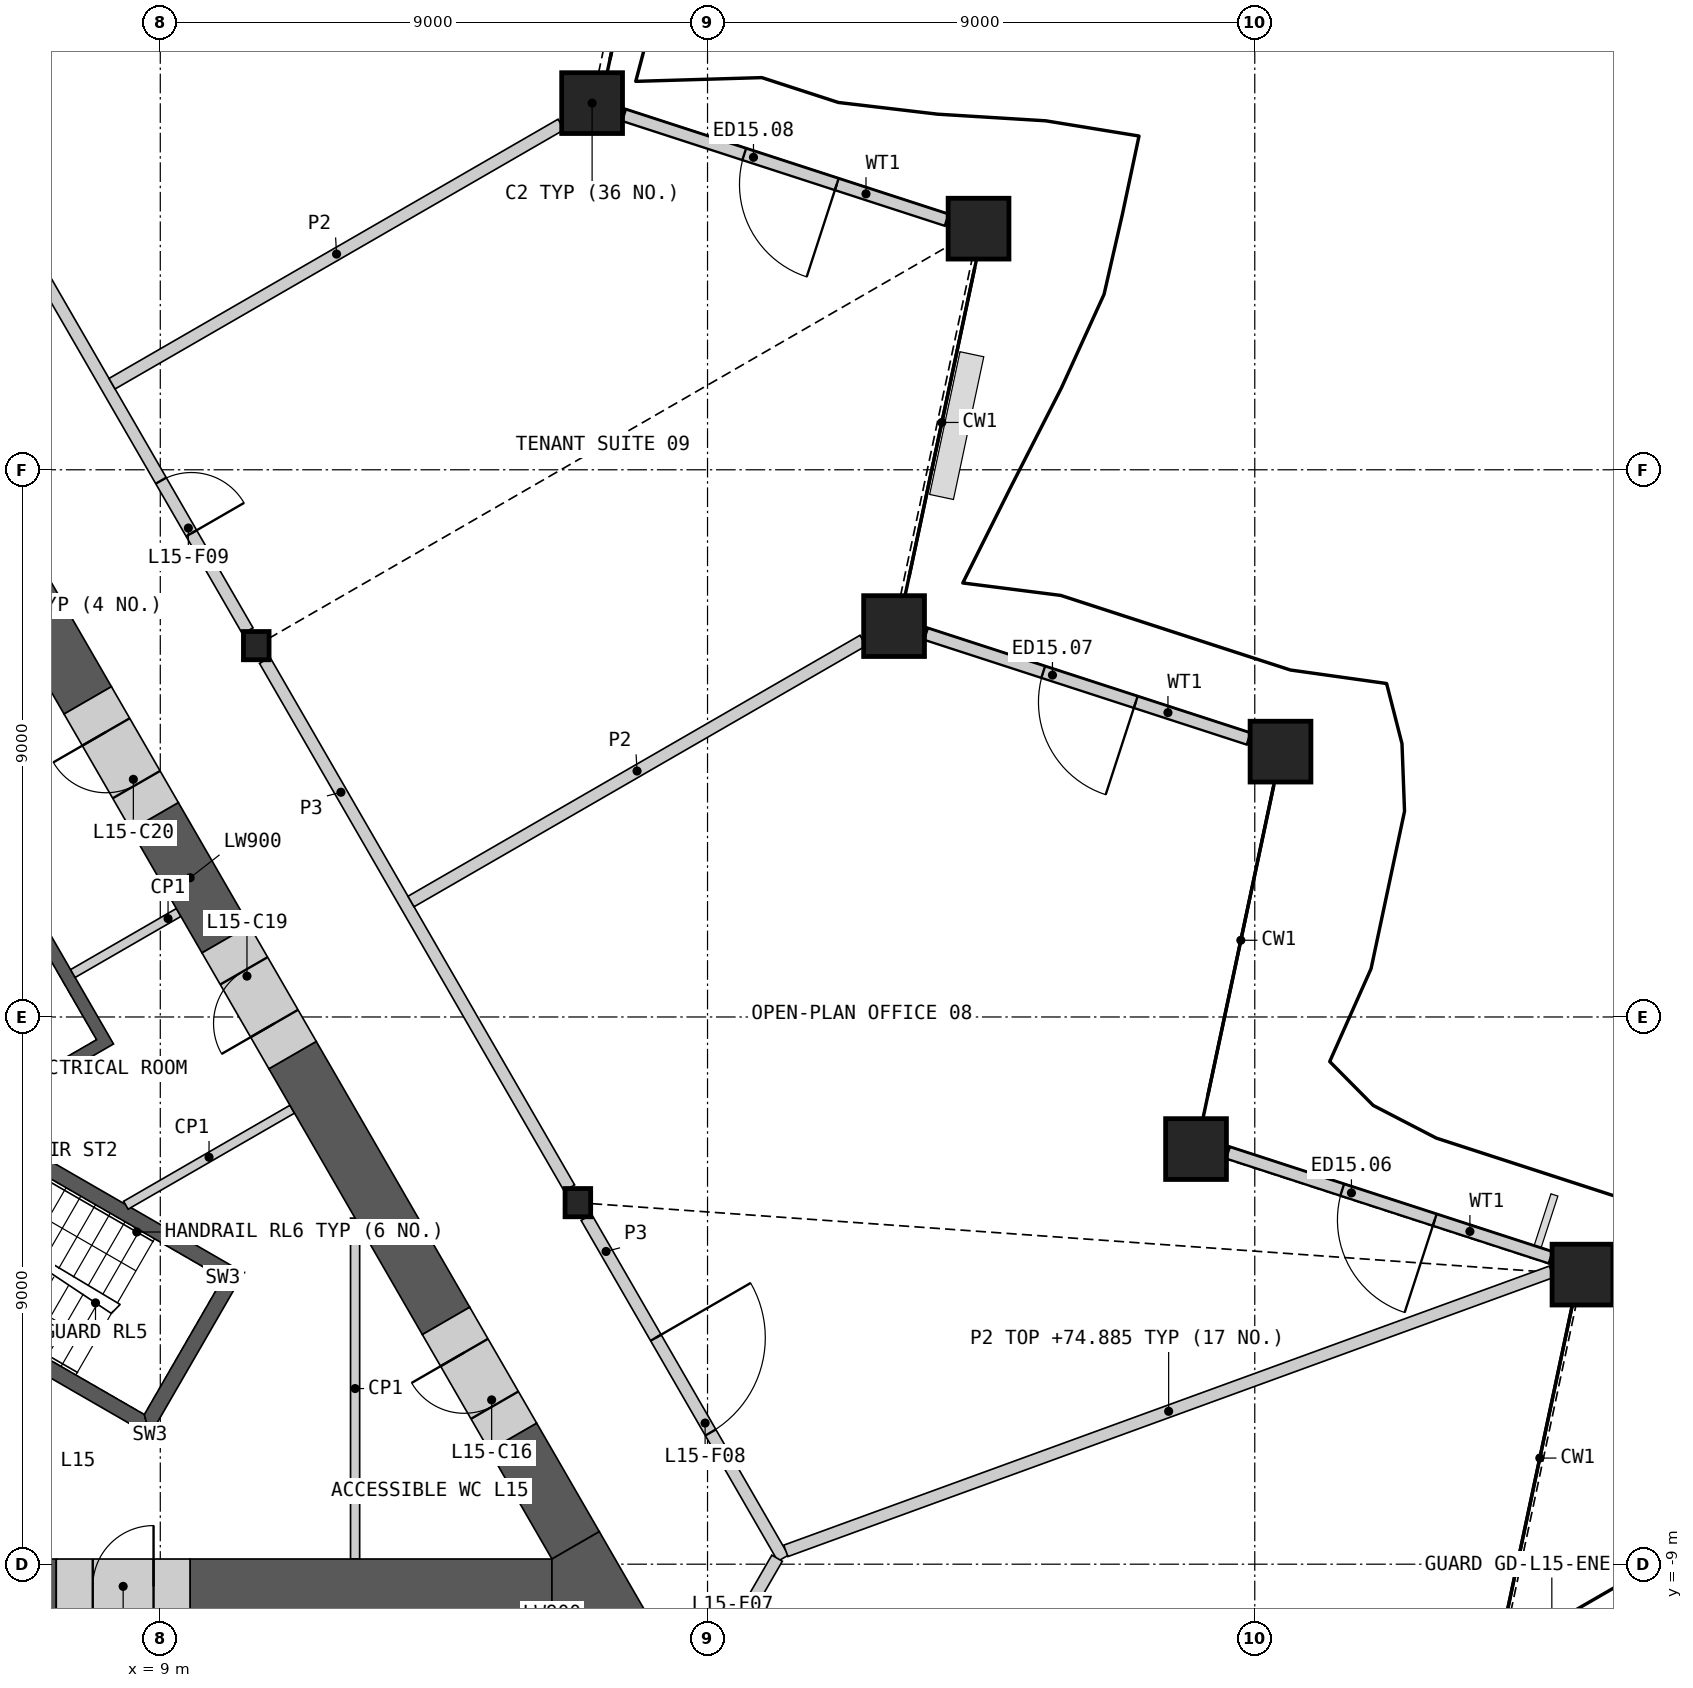
"""IFC4 building model, lengths in metres.
Left out: names, types, materials, properties, quantities, classifications, styles, units other than length and angle.
Written with IfcOpenShell. Run it as: python <this file> out.ifc"""

import sys

from ifc_helpers import new_model, si_unit, direction, frame, frame_2d, origin, origin_2d, place, context, subcontext, project, spatial, polyline, rectangle, hollow_rectangle, i_section, outline, extrude, element, fill, save


model = new_model("IFC4")
c1 = context("Model", 3, precision=1e-05, world=origin(), true_north=direction((0.0, 1.0)))
c2 = subcontext(c1, "Body", "Model", "MODEL_VIEW")
j1 = project(units=[si_unit("LENGTHUNIT", "METRE"), si_unit("PLANEANGLEUNIT", "RADIAN")], contexts=[c1])
p1 = place(None, origin())
s1 = spatial("IfcSite", under=j1, at=p1, CompositionType="ELEMENT")
p2 = place(p1, origin())
s2 = spatial("IfcBuilding", under=s1, at=p2, CompositionType="ELEMENT")
p3 = place(p2, frame((0.0, 0.0, 72.0)))
s3 = spatial("IfcBuildingStorey", under=s2, at=p3, CompositionType="ELEMENT", Elevation=72.0)
for number, where, z_axis, x_axis in (
    (1, (32.389, -4.237, 0.0), (0.0, 0.0, 1.0), (1.0, 0.0, 0.0)),
    (2, (26.034, -2.172, 0.0), (0.0, 0.0, 1.0), (1.0, 0.0, 0.0)),
    (3, (27.423, 4.364, 0.0), (0.0, 0.0, 1.0), (1.0, 0.0, 0.0)),
    (4, (21.068, 6.429, 0.0), (0.0, 0.0, 1.0), (1.0, 0.0, 0.0)),
    (5, (22.457, 12.966, 0.0), (0.0, 0.0, 1.0), (1.0, 0.0, 0.0)),
    (6, (16.102, 15.031, 0.0), (0.0, 0.0, 1.0), (1.0, 0.0, 0.0)),
):
    element("IfcColumn", number, at=place(p3, frame(where, z_axis=z_axis, x_axis=x_axis)), inside=s3, PredefinedType="COLUMN", context=c2, shape_type="SweptSolid", body=[
        extrude(hollow_rectangle(XDim=1.0, YDim=1.0, WallThickness=0.07, at=origin_2d()), origin(), (0.0, 0.0, 1.0), 4.2),
    ])
for number, where, z_axis, x_axis in (
    (7, (15.868, -3.054, 0.0), (0.0, 0.0, 1.0), (1.0, 0.0, 0.0)),
    (8, (10.578, 6.107, 0.0), (0.0, 0.0, 1.0), (1.0, 0.0, 0.0)),
):
    element("IfcColumn", number, at=place(p3, frame(where, z_axis=z_axis, x_axis=x_axis)), inside=s3, PredefinedType="COLUMN", context=c2, shape_type="SweptSolid", body=[
        extrude(i_section(OverallWidth=0.421, OverallDepth=0.465, WebThickness=0.045, FlangeThickness=0.072, at=origin_2d()), origin(), (0.0, 0.0, 1.0), 4.2),
    ])
p4 = place(p3, frame((31.865, -3.958, 0.0), z_axis=(0.0, 0.0, 1.0), x_axis=(-0.951066864375, 0.308985144444, 0.0)))
e9 = element("IfcWall", 9, at=p4, inside=s3, PredefinedType="SOLIDWALL", context=c2, shape_type="SweptSolid", body=[
    extrude(rectangle(XDim=5.579, YDim=0.2, at=frame_2d((2.79, 0.0))), origin(), (0.0, 0.0, 1.0), 3.189),
])
p5 = place(p4, frame((2.003, 0.0, 0.0)))
e10 = element("IfcOpeningElement", 10, at=p5, cuts=e9, PredefinedType="OPENING", context=c2, shape_type="SweptSolid", body=[
    extrude(rectangle(XDim=1.6, YDim=2.4, at=frame_2d((0.8, 1.2))), frame((0.0, 0.11, 0.0), z_axis=(0.0, -1.0, 0.0), x_axis=(1.0, 0.0, 0.0)), (0.0, 0.0, 1.0), 0.22),
])
p6 = place(p3, frame((26.899, 4.575, 0.0), z_axis=(0.0, 0.0, 1.0), x_axis=(-0.951066864375, 0.308985144444, 0.0)))
e11 = element("IfcWall", 11, at=p6, inside=s3, PredefinedType="SOLIDWALL", context=c2, shape_type="SweptSolid", body=[
    extrude(rectangle(XDim=5.579, YDim=0.2, at=frame_2d((2.79, 0.0))), origin(), (0.0, 0.0, 1.0), 3.189),
])
p7 = place(p6, frame((1.952, 0.0, 0.0)))
e12 = element("IfcOpeningElement", 12, at=p7, cuts=e11, PredefinedType="OPENING", context=c2, shape_type="SweptSolid", body=[
    extrude(rectangle(XDim=1.6, YDim=2.4, at=frame_2d((0.8, 1.2))), frame((0.0, 0.11, 0.0), z_axis=(0.0, -1.0, 0.0), x_axis=(1.0, 0.0, 0.0)), (0.0, 0.0, 1.0), 0.22),
])
p8 = place(p3, frame((21.933, 13.107, 0.0), z_axis=(0.0, 0.0, 1.0), x_axis=(-0.951066864375, 0.308985144444, 0.0)))
e13 = element("IfcWall", 13, at=p8, inside=s3, PredefinedType="SOLIDWALL", context=c2, shape_type="SweptSolid", body=[
    extrude(rectangle(XDim=5.579, YDim=0.2, at=frame_2d((2.79, 0.0))), origin(), (0.0, 0.0, 1.0), 3.189),
])
p9 = place(p8, frame((1.9, 0.0, 0.0)))
e14 = element("IfcOpeningElement", 14, at=p9, cuts=e13, PredefinedType="OPENING", context=c2, shape_type="SweptSolid", body=[
    extrude(rectangle(XDim=1.6, YDim=2.4, at=frame_2d((0.8, 1.2))), frame((0.0, 0.11, 0.0), z_axis=(0.0, -1.0, 0.0), x_axis=(1.0, 0.0, 0.0)), (0.0, 0.0, 1.0), 0.22),
])
p10 = place(p3, origin())
e15 = element("IfcWall", 15, at=p10, inside=s3, PredefinedType="SHEAR", context=c2, shape_type="SweptSolid", body=[
    extrude(outline(polyline([(2.66, 4.192), (4.831, 5.445), (8.231, -0.444), (6.061, -1.697), (5.96, -1.524), (7.952, -0.374), (6.952, 1.358), (4.96, 0.208), (4.861, 0.381), (6.852, 1.531), (5.852, 3.263), (3.861, 2.113), (3.76, 2.287), (5.752, 3.437), (4.752, 5.169), (2.76, 4.019), (2.66, 4.192)])), origin(), (0.0, 0.0, 1.0), 3.8),
])
p11 = place(p3, origin())
e16 = element("IfcWall", 16, at=p11, inside=s3, PredefinedType="SHEAR", context=c2, shape_type="SweptSolid", body=[
    extrude(outline(polyline([(3.763, -3.956), (8.83, -6.881), (8.738, -6.539), (3.888, -3.739), (3.763, -3.956)])), origin(), (0.0, 0.0, 1.0), 3.8),
])
p12 = place(p3, origin())
e17 = element("IfcWall", 17, at=p12, inside=s3, PredefinedType="SHEAR", context=c2, shape_type="SweptSolid", body=[
    extrude(outline(polyline([(8.83, -6.881), (10.374, -4.206), (10.032, -4.298), (8.738, -6.539), (8.83, -6.881)])), origin(), (0.0, 0.0, 1.0), 3.8),
])
p13 = place(p3, origin())
e18 = element("IfcWall", 18, at=p13, inside=s3, PredefinedType="SHEAR", context=c2, shape_type="SweptSolid", body=[
    extrude(outline(polyline([(10.032, -4.298), (10.374, -4.206), (5.307, -1.281), (5.182, -1.498), (10.032, -4.298)])), origin(), (0.0, 0.0, 1.0), 3.8),
])
p14 = place(p3, frame((9.302, 1.719, 0.0), z_axis=(0.0, 0.0, 1.0), x_axis=(-0.866035824272, -0.499981950752, 0.0)))
e19 = element("IfcWall", 19, at=p14, inside=s3, PredefinedType="PARTITIONING", context=c2, shape_type="SweptSolid", body=[
    extrude(rectangle(XDim=2.009, YDim=0.15, at=frame_2d((1.004, 0.0))), origin(), (0.0, 0.0, 1.0), 3.8),
])
p15 = place(p3, frame((11.17, -1.517, 0.0), z_axis=(0.0, 0.0, 1.0), x_axis=(-0.866037599206, -0.499978876315, 0.0)))
e20 = element("IfcWall", 20, at=p15, inside=s3, PredefinedType="PARTITIONING", context=c2, shape_type="SweptSolid", body=[
    extrude(rectangle(XDim=3.159, YDim=0.15, at=frame_2d((1.58, 0.0))), origin(), (0.0, 0.0, 1.0), 3.8),
])
p16 = place(p3, frame((12.204, -8.915, 0.0), z_axis=(0.0, 0.0, 1.0), x_axis=(0.0, 1.0, 0.0)))
e21 = element("IfcWall", 21, at=p16, inside=s3, PredefinedType="PARTITIONING", context=c2, shape_type="SweptSolid", body=[
    extrude(rectangle(XDim=5.607, YDim=0.15, at=frame_2d((2.804, 0.0))), origin(), (0.0, 0.0, 1.0), 3.8),
])
p17 = place(p3, frame((1.1, -9.365, 0.0), z_axis=(0.0, 0.0, 1.0), x_axis=(1.0, 0.0, 0.0)))
e22 = element("IfcWall", 22, at=p17, inside=s3, PredefinedType="SHEAR", context=c2, shape_type="SweptSolid", body=[
    extrude(rectangle(XDim=6.189, YDim=0.9, at=frame_2d((3.095, 0.0))), origin(), (0.0, 0.0, 1.0), 3.8),
])
p18 = place(p3, frame((9.49, -9.365, 0.0), z_axis=(0.0, 0.0, 1.0), x_axis=(1.0, 0.0, 0.0)))
e23 = element("IfcWall", 23, at=p18, inside=s3, PredefinedType="SHEAR", context=c2, shape_type="SweptSolid", body=[
    extrude(rectangle(XDim=5.952, YDim=0.9, at=frame_2d((2.976, 0.0))), origin(), (0.0, 0.0, 1.0), 3.8),
])
p19 = place(p3, frame((7.807, 5.208, 0.0), z_axis=(0.0, 0.0, 1.0), x_axis=(-0.499986664161, 0.866033103098, 0.0)))
e24 = element("IfcWall", 24, at=p19, inside=s3, PredefinedType="SHEAR", context=c2, shape_type="SweptSolid", body=[
    extrude(rectangle(XDim=6.586, YDim=0.9, at=frame_2d((3.293, 0.0))), origin(), (0.0, 0.0, 1.0), 3.8),
])
p20 = place(p3, frame((13.7, -4.999, 0.0), z_axis=(0.0, 0.0, 1.0), x_axis=(-0.499993158726, 0.86602935356, 0.0)))
e25 = element("IfcWall", 25, at=p20, inside=s3, PredefinedType="SHEAR", context=c2, shape_type="SweptSolid", body=[
    extrude(rectangle(XDim=5.048, YDim=0.9, at=frame_2d((2.524, 0.0))), origin(), (0.0, 0.0, 1.0), 3.8),
])
p21 = place(p3, frame((10.075, 1.279, 0.0), z_axis=(0.0, 0.0, 1.0), x_axis=(-0.500026924946, 0.866009858102, 0.0)))
e26 = element("IfcWall", 26, at=p21, inside=s3, PredefinedType="SHEAR", context=c2, shape_type="SweptSolid", body=[
    extrude(rectangle(XDim=2.337, YDim=0.9, at=frame_2d((1.168, 0.0))), origin(), (0.0, 0.0, 1.0), 3.8),
])
p22 = place(p3, frame((15.831, -8.69, 0.0), z_axis=(0.0, 0.0, 1.0), x_axis=(-0.499971832445, 0.866041665719, 0.0)))
e27 = element("IfcWall", 27, at=p22, inside=s3, PredefinedType="SHEAR", context=c2, shape_type="SweptSolid", body=[
    extrude(rectangle(XDim=2.062, YDim=0.9, at=frame_2d((1.031, 0.0))), origin(), (0.0, 0.0, 1.0), 3.8),
])
p23 = place(p3, origin())
e28 = element("IfcWall", 28, at=p23, inside=s3, PredefinedType="SHEAR", context=c2, shape_type="SweptSolid", body=[
    extrude(outline(polyline([(15.441, -9.815), (15.441, -8.915), (16.221, -8.465), (17.0, -9.815), (15.441, -9.815)])), origin(), (0.0, 0.0, 1.0), 3.8),
])
p24 = place(p3, frame((14.8, -6.904, 0.0), z_axis=(0.0, 0.0, 1.0), x_axis=(-0.50002983664, 0.866008176907, 0.0)))
e29 = element("IfcWall", 29, at=p24, inside=s3, PredefinedType="SHEAR", context=c2, shape_type="SweptSolid", body=[
    extrude(rectangle(XDim=2.2, YDim=0.9, at=frame_2d((1.1, 0.0))), origin(), (0.0, 0.0, 1.0), 3.8),
])
p25 = place(p24, frame((0.6, 0.0, 0.0)))
e30 = element("IfcOpeningElement", 30, at=p25, cuts=e29, PredefinedType="OPENING", context=c2, shape_type="SweptSolid", body=[
    extrude(rectangle(XDim=1.0, YDim=2.1, at=frame_2d((0.5, 1.05))), frame((0.0, 0.46, 0.0), z_axis=(0.0, -1.0, 0.0), x_axis=(1.0, 0.0, 0.0)), (0.0, 0.0, 1.0), 0.92),
])
p26 = place(p3, frame((7.289, -9.365, 0.0), z_axis=(0.0, 0.0, 1.0), x_axis=(1.0, 0.0, 0.0)))
e31 = element("IfcWall", 31, at=p26, inside=s3, PredefinedType="SHEAR", context=c2, shape_type="SweptSolid", body=[
    extrude(rectangle(XDim=2.2, YDim=0.9, at=frame_2d((1.1, 0.0))), origin(), (0.0, 0.0, 1.0), 3.8),
])
p27 = place(p26, frame((0.6, 0.0, 0.0)))
e32 = element("IfcOpeningElement", 32, at=p27, cuts=e31, PredefinedType="OPENING", context=c2, shape_type="SweptSolid", body=[
    extrude(rectangle(XDim=1.0, YDim=2.1, at=frame_2d((0.5, 1.05))), frame((0.0, 0.46, 0.0), z_axis=(0.0, -1.0, 0.0), x_axis=(1.0, 0.0, 0.0)), (0.0, 0.0, 1.0), 0.92),
])
p28 = place(p3, frame((11.176, -0.627, 0.0), z_axis=(0.0, 0.0, 1.0), x_axis=(-0.499946605688, 0.86605622881, 0.0)))
e33 = element("IfcWall", 33, at=p28, inside=s3, PredefinedType="SHEAR", context=c2, shape_type="SweptSolid", body=[
    extrude(rectangle(XDim=2.2, YDim=0.9, at=frame_2d((1.1, 0.0))), origin(), (0.0, 0.0, 1.0), 3.8),
])
p29 = place(p28, frame((0.6, 0.0, 0.0)))
e34 = element("IfcOpeningElement", 34, at=p29, cuts=e33, PredefinedType="OPENING", context=c2, shape_type="SweptSolid", body=[
    extrude(rectangle(XDim=1.0, YDim=2.1, at=frame_2d((0.5, 1.05))), frame((0.0, 0.46, 0.0), z_axis=(0.0, -1.0, 0.0), x_axis=(1.0, 0.0, 0.0)), (0.0, 0.0, 1.0), 0.92),
])
p30 = place(p3, frame((8.907, 3.302, 0.0), z_axis=(0.0, 0.0, 1.0), x_axis=(-0.50002983664, 0.866008176907, 0.0)))
e35 = element("IfcWall", 35, at=p30, inside=s3, PredefinedType="SHEAR", context=c2, shape_type="SweptSolid", body=[
    extrude(rectangle(XDim=2.2, YDim=0.9, at=frame_2d((1.1, 0.0))), origin(), (0.0, 0.0, 1.0), 3.8),
])
p31 = place(p30, frame((0.6, 0.0, 0.0)))
e36 = element("IfcOpeningElement", 36, at=p31, cuts=e35, PredefinedType="OPENING", context=c2, shape_type="SweptSolid", body=[
    extrude(rectangle(XDim=1.0, YDim=2.1, at=frame_2d((0.5, 1.05))), frame((0.0, 0.46, 0.0), z_axis=(0.0, -1.0, 0.0), x_axis=(1.0, 0.0, 0.0)), (0.0, 0.0, 1.0), 0.92),
])
p32 = place(p3, frame((10.719, 5.865, 0.0), z_axis=(0.0, 0.0, 1.0), x_axis=(0.49999175339, -0.866030164915, 0.0)))
e37 = element("IfcWall", 37, at=p32, inside=s3, PredefinedType="PARTITIONING", context=c2, shape_type="SweptSolid", body=[
    extrude(rectangle(XDim=10.019, YDim=0.2, at=frame_2d((5.009, 0.0))), origin(), (0.0, 0.0, 1.0), 3.8),
])
p33 = place(p3, frame((5.429, 15.026, 0.0), z_axis=(0.0, 0.0, 1.0), x_axis=(0.50001002959, -0.86601961312, 0.0)))
e38 = element("IfcWall", 38, at=p33, inside=s3, PredefinedType="PARTITIONING", context=c2, shape_type="SweptSolid", body=[
    extrude(rectangle(XDim=10.019, YDim=0.2, at=frame_2d((5.009, 0.0))), origin(), (0.0, 0.0, 1.0), 3.8),
])
p34 = place(p33, frame((7.165, 0.0, 0.0)))
e39 = element("IfcOpeningElement", 39, at=p34, cuts=e38, PredefinedType="OPENING", context=c2, shape_type="SweptSolid", body=[
    extrude(rectangle(XDim=1.0, YDim=2.1, at=frame_2d((0.5, 1.05))), frame((0.0, 0.11, 0.0), z_axis=(0.0, -1.0, 0.0), x_axis=(1.0, 0.0, 0.0)), (0.0, 0.0, 1.0), 0.22),
])
p35 = place(p3, frame((16.008, -3.296, 0.0), z_axis=(0.0, 0.0, 1.0), x_axis=(0.499984737558, -0.86603421538, 0.0)))
e40 = element("IfcWall", 40, at=p35, inside=s3, PredefinedType="PARTITIONING", context=c2, shape_type="SweptSolid", body=[
    extrude(rectangle(XDim=6.473, YDim=0.2, at=frame_2d((3.236, 0.0))), origin(), (0.0, 0.0, 1.0), 3.8),
])
p36 = place(p35, frame((2.285, 0.0, 0.0)))
e41 = element("IfcOpeningElement", 41, at=p36, cuts=e40, PredefinedType="OPENING", context=c2, shape_type="SweptSolid", body=[
    extrude(rectangle(XDim=1.8, YDim=2.1, at=frame_2d((0.9, 1.05))), frame((0.0, 0.11, 0.0), z_axis=(0.0, -1.0, 0.0), x_axis=(1.0, 0.0, 0.0)), (0.0, 0.0, 1.0), 0.22),
])
p37 = place(p3, frame((17.281, -12.128, 0.0), z_axis=(0.0, 0.0, 1.0), x_axis=(0.499958791762, 0.866049194065, 0.0)))
e42 = element("IfcWall", 42, at=p37, inside=s3, PredefinedType="PARTITIONING", context=c2, shape_type="SweptSolid", body=[
    extrude(rectangle(XDim=3.726, YDim=0.2, at=frame_2d((1.863, 0.0))), origin(), (0.0, 0.0, 1.0), 3.8),
])
p38 = place(p37, frame((1.363, 0.0, 0.0)))
e43 = element("IfcOpeningElement", 43, at=p38, cuts=e42, PredefinedType="OPENING", context=c2, shape_type="SweptSolid", body=[
    extrude(rectangle(XDim=1.0, YDim=2.1, at=frame_2d((0.5, 1.05))), frame((0.0, 0.11, 0.0), z_axis=(0.0, -1.0, 0.0), x_axis=(1.0, 0.0, 0.0)), (0.0, 0.0, 1.0), 0.22),
])
p39 = place(p3, frame((19.288, -8.781, 0.0), z_axis=(0.0, 0.0, 1.0), x_axis=(0.939515478087, 0.34250644729, 0.0)))
e44 = element("IfcWall", 44, at=p39, inside=s3, PredefinedType="PARTITIONING", context=c2, shape_type="SweptSolid", body=[
    extrude(rectangle(XDim=13.402, YDim=0.2, at=frame_2d((6.701, 0.0))), origin(), (0.0, 0.0, 1.0), 2.885),
])
p40 = place(p3, frame((13.124, 1.899, 0.0), z_axis=(0.0, 0.0, 1.0), x_axis=(0.866024086673, 0.500002281298, 0.0)))
e45 = element("IfcWall", 45, at=p40, inside=s3, PredefinedType="PARTITIONING", context=c2, shape_type="SweptSolid", body=[
    extrude(rectangle(XDim=8.584, YDim=0.2, at=frame_2d((4.292, 0.0))), origin(), (0.0, 0.0, 1.0), 2.885),
])
p41 = place(p3, frame((8.207, 10.416, 0.0), z_axis=(0.0, 0.0, 1.0), x_axis=(0.866023490266, 0.500003314297, 0.0)))
e46 = element("IfcWall", 46, at=p41, inside=s3, PredefinedType="PARTITIONING", context=c2, shape_type="SweptSolid", body=[
    extrude(rectangle(XDim=8.528, YDim=0.2, at=frame_2d((4.264, 0.0))), origin(), (0.0, 0.0, 1.0), 2.885),
])
p42 = place(p5, origin())
e47 = element("IfcDoor", 47, at=p42, inside=s3, OperationType="DOUBLE_DOOR_SINGLE_SWING", PredefinedType="DOOR", context=c2, shape_type="SweptSolid", body=[
    extrude(rectangle(XDim=1.6, YDim=2.4, at=frame_2d((0.8, 1.2))), frame((0.0, 0.025, 0.0), z_axis=(0.0, -1.0, 0.0), x_axis=(1.0, 0.0, 0.0)), (0.0, 0.0, 1.0), 0.05),
])
fill(e10, e47)
p43 = place(p7, origin())
e48 = element("IfcDoor", 48, at=p43, inside=s3, OperationType="DOUBLE_DOOR_SINGLE_SWING", PredefinedType="DOOR", context=c2, shape_type="SweptSolid", body=[
    extrude(rectangle(XDim=1.6, YDim=2.4, at=frame_2d((0.8, 1.2))), frame((0.0, 0.025, 0.0), z_axis=(0.0, -1.0, 0.0), x_axis=(1.0, 0.0, 0.0)), (0.0, 0.0, 1.0), 0.05),
])
fill(e12, e48)
p44 = place(p9, origin())
e49 = element("IfcDoor", 49, at=p44, inside=s3, OperationType="DOUBLE_DOOR_SINGLE_SWING", PredefinedType="DOOR", context=c2, shape_type="SweptSolid", body=[
    extrude(rectangle(XDim=1.6, YDim=2.4, at=frame_2d((0.8, 1.2))), frame((0.0, 0.025, 0.0), z_axis=(0.0, -1.0, 0.0), x_axis=(1.0, 0.0, 0.0)), (0.0, 0.0, 1.0), 0.05),
])
fill(e14, e49)
p45 = place(p25, origin())
e50 = element("IfcDoor", 50, at=p45, inside=s3, OperationType="SINGLE_SWING_RIGHT", PredefinedType="DOOR", context=c2, shape_type="SweptSolid", body=[
    extrude(rectangle(XDim=1.0, YDim=2.1, at=frame_2d((0.5, 1.05))), frame((0.0, 0.205, 0.0), z_axis=(0.0, -1.0, 0.0), x_axis=(1.0, 0.0, 0.0)), (0.0, 0.0, 1.0), 0.05),
])
fill(e30, e50)
p46 = place(p27, origin())
e51 = element("IfcDoor", 51, at=p46, inside=s3, OperationType="SINGLE_SWING_RIGHT", PredefinedType="DOOR", context=c2, shape_type="SweptSolid", body=[
    extrude(rectangle(XDim=1.0, YDim=2.1, at=frame_2d((0.5, 1.05))), frame((0.0, 0.205, 0.0), z_axis=(0.0, -1.0, 0.0), x_axis=(1.0, 0.0, 0.0)), (0.0, 0.0, 1.0), 0.05),
])
fill(e32, e51)
p47 = place(p29, origin())
e52 = element("IfcDoor", 52, at=p47, inside=s3, OperationType="SINGLE_SWING_LEFT", PredefinedType="DOOR", context=c2, shape_type="SweptSolid", body=[
    extrude(rectangle(XDim=1.0, YDim=2.1, at=frame_2d((0.5, 1.05))), frame((0.0, 0.205, 0.0), z_axis=(0.0, -1.0, 0.0), x_axis=(1.0, 0.0, 0.0)), (0.0, 0.0, 1.0), 0.05),
])
fill(e34, e52)
p48 = place(p31, origin())
e53 = element("IfcDoor", 53, at=p48, inside=s3, OperationType="SINGLE_SWING_RIGHT", PredefinedType="DOOR", context=c2, shape_type="SweptSolid", body=[
    extrude(rectangle(XDim=1.0, YDim=2.1, at=frame_2d((0.5, 1.05))), frame((0.0, 0.205, 0.0), z_axis=(0.0, -1.0, 0.0), x_axis=(1.0, 0.0, 0.0)), (0.0, 0.0, 1.0), 0.05),
])
fill(e36, e53)
p49 = place(p36, origin())
e54 = element("IfcDoor", 54, at=p49, inside=s3, OperationType="DOUBLE_DOOR_SINGLE_SWING", PredefinedType="DOOR", context=c2, shape_type="SweptSolid", body=[
    extrude(rectangle(XDim=1.8, YDim=2.1, at=frame_2d((0.9, 1.05))), frame((0.0, 0.025, 0.0), z_axis=(0.0, -1.0, 0.0), x_axis=(1.0, 0.0, 0.0)), (0.0, 0.0, 1.0), 0.05),
])
fill(e41, e54)
p50 = place(p34, origin())
e55 = element("IfcDoor", 55, at=p50, inside=s3, OperationType="SINGLE_SWING_RIGHT", PredefinedType="DOOR", context=c2, shape_type="SweptSolid", body=[
    extrude(rectangle(XDim=1.0, YDim=2.1, at=frame_2d((0.5, 1.05))), frame((0.0, 0.025, 0.0), z_axis=(0.0, -1.0, 0.0), x_axis=(1.0, 0.0, 0.0)), (0.0, 0.0, 1.0), 0.05),
])
fill(e39, e55)
save(model, sys.argv[1])
